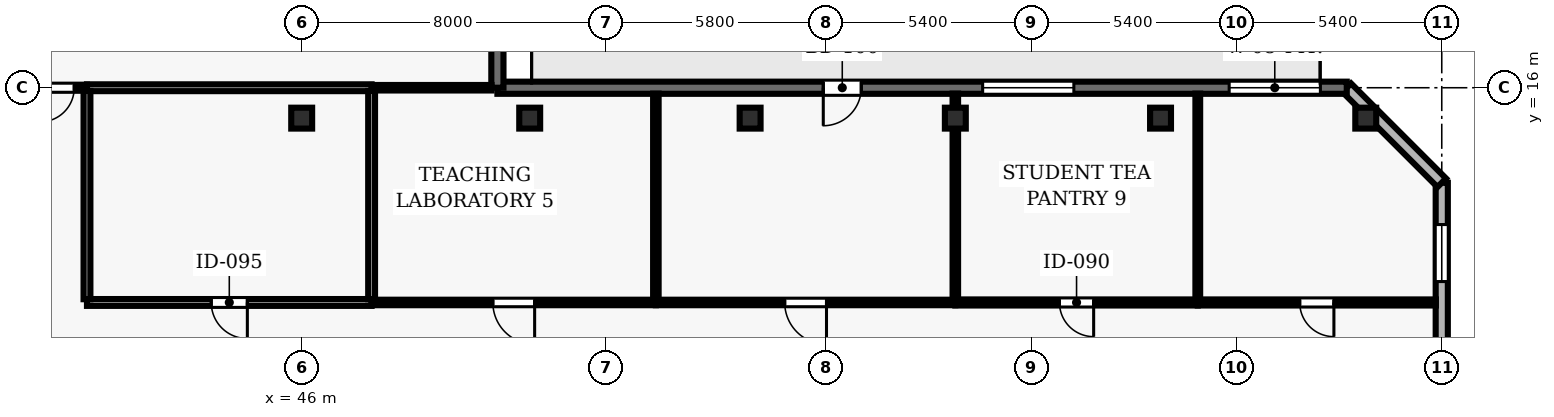
"""IFC4 building model, lengths in metres.
Left out: names, types, materials, properties, quantities, classifications, styles, units other than length and angle.
Written with IfcOpenShell. Run it as: python <this file> out.ifc"""

import sys

from ifc_helpers import new_model, si_unit, direction, frame, frame_2d, origin, origin_2d, place, context, subcontext, project, spatial, rectangle, hollow_rectangle, extrude, element, fill, save


model = new_model("IFC4")
c1 = context("Model", 3, precision=1e-05, world=origin(), true_north=direction((0.0, 1.0)))
c2 = subcontext(c1, "Body", "Model", "MODEL_VIEW")
j1 = project(units=[si_unit("LENGTHUNIT", "METRE"), si_unit("PLANEANGLEUNIT", "RADIAN")], contexts=[c1])
p1 = place(None, origin())
s1 = spatial("IfcSite", under=j1, at=p1, CompositionType="ELEMENT")
p2 = place(p1, origin())
s2 = spatial("IfcBuilding", under=s1, at=p2, CompositionType="ELEMENT")
p3 = place(p2, frame((0.0, 0.0, 66.1)))
s3 = spatial("IfcBuildingStorey", under=s2, at=p3, CompositionType="ELEMENT", Elevation=66.1)
for number, where, z_axis, x_axis in (
    (1, (46.0, 15.2, 0.0), (0.0, 0.0, 1.0), (1.0, 0.0, 0.0)),
    (2, (52.0, 15.2, 0.0), (0.0, 0.0, 1.0), (1.0, 0.0, 0.0)),
    (3, (57.8, 15.2, 0.0), (0.0, 0.0, 1.0), (1.0, 0.0, 0.0)),
    (4, (63.2, 15.2, 0.0), (0.0, 0.0, 1.0), (1.0, 0.0, 0.0)),
    (5, (68.6, 15.2, 0.0), (0.0, 0.0, 1.0), (1.0, 0.0, 0.0)),
    (6, (74.0, 15.2, 0.0), (0.0, 0.0, 1.0), (1.0, 0.0, 0.0)),
):
    element("IfcColumn", number, at=place(p3, frame(where, z_axis=z_axis, x_axis=x_axis)), inside=s3, PredefinedType="COLUMN", context=c2, shape_type="SweptSolid", body=[
        extrude(hollow_rectangle(XDim=0.55, YDim=0.55, WallThickness=0.025, at=origin_2d()), origin(), (0.0, 0.0, 1.0), 3.9),
    ])
p4 = place(p3, frame((76.0, 2.5, 0.0), z_axis=(0.0, 0.0, 1.0), x_axis=(0.0, 1.0, 0.0)))
e7 = element("IfcWall", 7, at=p4, inside=s3, PredefinedType="SOLIDWALL", context=c2, shape_type="SweptSolid", body=[
    extrude(rectangle(XDim=11.0, YDim=0.32, at=frame_2d((5.5, 0.0))), origin(), (0.0, 0.0, 1.0), 3.69),
])
p5 = place(p4, frame((2.0, 0.0, 0.9)))
e8 = element("IfcOpeningElement", 8, at=p5, cuts=e7, PredefinedType="OPENING", context=c2, shape_type="SweptSolid", body=[
    extrude(rectangle(XDim=1.5, YDim=1.8, at=frame_2d((0.75, 0.9))), frame((0.0, 0.17, 0.0), z_axis=(0.0, -1.0, 0.0), x_axis=(1.0, 0.0, 0.0)), (0.0, 0.0, 1.0), 0.34),
])
p6 = place(p4, frame((8.4, 0.0, 0.9)))
e9 = element("IfcOpeningElement", 9, at=p6, cuts=e7, PredefinedType="OPENING", context=c2, shape_type="SweptSolid", body=[
    extrude(rectangle(XDim=1.5, YDim=1.8, at=frame_2d((0.75, 0.9))), frame((0.0, 0.17, 0.0), z_axis=(0.0, -1.0, 0.0), x_axis=(1.0, 0.0, 0.0)), (0.0, 0.0, 1.0), 0.34),
])
p7 = place(p3, frame((76.0, 13.5, 0.0), z_axis=(0.0, 0.0, 1.0), x_axis=(-0.707106781187, 0.707106781187, 0.0)))
e10 = element("IfcWall", 10, at=p7, inside=s3, PredefinedType="SOLIDWALL", context=c2, shape_type="SweptSolid", body=[
    extrude(rectangle(XDim=3.536, YDim=0.32, at=frame_2d((1.768, 0.0))), origin(), (0.0, 0.0, 1.0), 3.69),
])
p8 = place(p3, frame((73.5, 16.0, 0.0), z_axis=(0.0, 0.0, 1.0), x_axis=(-1.0, 0.0, 0.0)))
e11 = element("IfcWall", 11, at=p8, inside=s3, PredefinedType="SOLIDWALL", context=c2, shape_type="SweptSolid", body=[
    extrude(rectangle(XDim=22.35, YDim=0.32, at=frame_2d((11.175, 0.0))), origin(), (0.0, 0.0, 1.0), 3.69),
])
p9 = place(p8, frame((12.775, 0.0, 0.0)))
e12 = element("IfcOpeningElement", 12, at=p9, cuts=e11, PredefinedType="OPENING", context=c2, shape_type="SweptSolid", body=[
    extrude(rectangle(XDim=1.0, YDim=2.2, at=frame_2d((0.5, 1.1))), frame((0.0, 0.17, 0.0), z_axis=(0.0, -1.0, 0.0), x_axis=(1.0, 0.0, 0.0)), (0.0, 0.0, 1.0), 0.34),
])
p10 = place(p8, frame((0.694, 0.0, 0.9)))
e13 = element("IfcOpeningElement", 13, at=p10, cuts=e11, PredefinedType="OPENING", context=c2, shape_type="SweptSolid", body=[
    extrude(rectangle(XDim=2.4, YDim=1.8, at=frame_2d((1.2, 0.9))), frame((0.0, 0.17, 0.0), z_axis=(0.0, -1.0, 0.0), x_axis=(1.0, 0.0, 0.0)), (0.0, 0.0, 1.0), 0.34),
])
p11 = place(p8, frame((7.181, 0.0, 0.9)))
e14 = element("IfcOpeningElement", 14, at=p11, cuts=e11, PredefinedType="OPENING", context=c2, shape_type="SweptSolid", body=[
    extrude(rectangle(XDim=2.4, YDim=1.8, at=frame_2d((1.2, 0.9))), frame((0.0, 0.17, 0.0), z_axis=(0.0, -1.0, 0.0), x_axis=(1.0, 0.0, 0.0)), (0.0, 0.0, 1.0), 0.34),
])
p12 = place(p3, frame((51.15, 16.0, 0.0), z_axis=(0.0, 0.0, 1.0), x_axis=(0.0, 1.0, 0.0)))
e15 = element("IfcWall", 15, at=p12, inside=s3, PredefinedType="SOLIDWALL", context=c2, shape_type="SweptSolid", body=[
    extrude(rectangle(XDim=9.442, YDim=0.32, at=frame_2d((4.721, 0.0))), origin(), (0.0, 0.0, 1.0), 3.69),
])
p13 = place(p12, frame((3.321, 0.0, 0.9)))
e16 = element("IfcOpeningElement", 16, at=p13, cuts=e15, PredefinedType="OPENING", context=c2, shape_type="SweptSolid", body=[
    extrude(rectangle(XDim=2.8, YDim=1.8, at=frame_2d((1.4, 0.9))), frame((0.0, 0.17, 0.0), z_axis=(0.0, -1.0, 0.0), x_axis=(1.0, 0.0, 0.0)), (0.0, 0.0, 1.0), 0.34),
])
p14 = place(p3, frame((40.35, 16.0, 0.0), z_axis=(0.0, 0.0, 1.0), x_axis=(-1.0, 0.0, 0.0)))
e17 = element("IfcWall", 17, at=p14, inside=s3, PredefinedType="PARTITIONING", context=c2, shape_type="SweptSolid", body=[
    extrude(rectangle(XDim=2.27, YDim=0.16, at=frame_2d((1.135, 0.0))), origin(), (0.0, 0.0, 1.0), 3.69),
])
p15 = place(p14, frame((0.335, 0.0, 0.0)))
e18 = element("IfcOpeningElement", 18, at=p15, cuts=e17, PredefinedType="OPENING", context=c2, shape_type="SweptSolid", body=[
    extrude(rectangle(XDim=0.9, YDim=2.1, at=frame_2d((0.45, 1.05))), frame((0.0, 0.09, 0.0), z_axis=(0.0, -1.0, 0.0), x_axis=(1.0, 0.0, 0.0)), (0.0, 0.0, 1.0), 0.18),
])
p16 = place(p3, frame((47.84, 10.35, 0.0), z_axis=(0.0, 0.0, 1.0), x_axis=(-1.0, 0.0, 0.0)))
e19 = element("IfcWall", 19, at=p16, inside=s3, PredefinedType="PARTITIONING", context=c2, shape_type="SweptSolid", body=[
    extrude(rectangle(XDim=7.49, YDim=0.18, at=frame_2d((3.745, 0.0))), origin(), (0.0, 0.0, 1.0), 3.277),
])
p17 = place(p16, frame((3.27, 0.0, 0.0)))
e20 = element("IfcOpeningElement", 20, at=p17, cuts=e19, PredefinedType="OPENING", context=c2, shape_type="SweptSolid", body=[
    extrude(rectangle(XDim=0.95, YDim=2.1, at=frame_2d((0.475, 1.05))), frame((0.0, 0.1, 0.0), z_axis=(0.0, -1.0, 0.0), x_axis=(1.0, 0.0, 0.0)), (0.0, 0.0, 1.0), 0.2),
])
p18 = place(p3, frame((47.84, 16.0, 0.0), z_axis=(0.0, 0.0, 1.0), x_axis=(1.0, 0.0, 0.0)))
e21 = element("IfcWall", 21, at=p18, inside=s3, PredefinedType="PARTITIONING", context=c2, shape_type="SweptSolid", body=[
    extrude(rectangle(XDim=3.155, YDim=0.145, at=frame_2d((1.578, 0.0))), origin(), (0.0, 0.0, 1.0), 3.39),
])
p19 = place(p3, frame((47.84, 16.0, 0.0), z_axis=(0.0, 0.0, 1.0), x_axis=(-1.0, 0.0, 0.0)))
e22 = element("IfcWall", 22, at=p19, inside=s3, PredefinedType="PARTITIONING", context=c2, shape_type="SweptSolid", body=[
    extrude(rectangle(XDim=7.49, YDim=0.18, at=frame_2d((3.745, 0.0))), origin(), (0.0, 0.0, 1.0), 3.39),
])
p20 = place(p3, frame((55.32, 10.35, 0.0), z_axis=(0.0, 0.0, 1.0), x_axis=(-1.0, 0.0, 0.0)))
e23 = element("IfcWall", 23, at=p20, inside=s3, PredefinedType="PARTITIONING", context=c2, shape_type="SweptSolid", body=[
    extrude(rectangle(XDim=7.48, YDim=0.145, at=frame_2d((3.74, 0.0))), origin(), (0.0, 0.0, 1.0), 3.277),
])
p21 = place(p20, frame((3.19, 0.0, 0.0)))
e24 = element("IfcOpeningElement", 24, at=p21, cuts=e23, PredefinedType="OPENING", context=c2, shape_type="SweptSolid", body=[
    extrude(rectangle(XDim=1.1, YDim=2.15, at=frame_2d((0.55, 1.075))), frame((0.0, 0.083, 0.0), z_axis=(0.0, -1.0, 0.0), x_axis=(1.0, 0.0, 0.0)), (0.0, 0.0, 1.0), 0.165),
])
p22 = place(p3, frame((63.2, 10.35, 0.0), z_axis=(0.0, 0.0, 1.0), x_axis=(-1.0, 0.0, 0.0)))
e25 = element("IfcWall", 25, at=p22, inside=s3, PredefinedType="PARTITIONING", context=c2, shape_type="SweptSolid", body=[
    extrude(rectangle(XDim=7.88, YDim=0.145, at=frame_2d((3.94, 0.0))), origin(), (0.0, 0.0, 1.0), 3.277),
])
p23 = place(p22, frame((3.39, 0.0, 0.0)))
e26 = element("IfcOpeningElement", 26, at=p23, cuts=e25, PredefinedType="OPENING", context=c2, shape_type="SweptSolid", body=[
    extrude(rectangle(XDim=1.1, YDim=2.15, at=frame_2d((0.55, 1.075))), frame((0.0, 0.083, 0.0), z_axis=(0.0, -1.0, 0.0), x_axis=(1.0, 0.0, 0.0)), (0.0, 0.0, 1.0), 0.165),
])
p24 = place(p3, frame((69.58, 10.35, 0.0), z_axis=(0.0, 0.0, 1.0), x_axis=(-1.0, 0.0, 0.0)))
e27 = element("IfcWall", 27, at=p24, inside=s3, PredefinedType="PARTITIONING", context=c2, shape_type="SweptSolid", body=[
    extrude(rectangle(XDim=6.38, YDim=0.16, at=frame_2d((3.19, 0.0))), origin(), (0.0, 0.0, 1.0), 3.277),
])
p25 = place(p24, frame((2.74, 0.0, 0.0)))
e28 = element("IfcOpeningElement", 28, at=p25, cuts=e27, PredefinedType="OPENING", context=c2, shape_type="SweptSolid", body=[
    extrude(rectangle(XDim=0.9, YDim=2.1, at=frame_2d((0.45, 1.05))), frame((0.0, 0.09, 0.0), z_axis=(0.0, -1.0, 0.0), x_axis=(1.0, 0.0, 0.0)), (0.0, 0.0, 1.0), 0.18),
])
p26 = place(p3, frame((75.845, 10.35, 0.0), z_axis=(0.0, 0.0, 1.0), x_axis=(-1.0, 0.0, 0.0)))
e29 = element("IfcWall", 29, at=p26, inside=s3, PredefinedType="PARTITIONING", context=c2, shape_type="SweptSolid", body=[
    extrude(rectangle(XDim=6.265, YDim=0.16, at=frame_2d((3.132, 0.0))), origin(), (0.0, 0.0, 1.0), 3.69),
])
p27 = place(p26, frame((2.683, 0.0, 0.0)))
e30 = element("IfcOpeningElement", 30, at=p27, cuts=e29, PredefinedType="OPENING", context=c2, shape_type="SweptSolid", body=[
    extrude(rectangle(XDim=0.9, YDim=2.1, at=frame_2d((0.45, 1.05))), frame((0.0, 0.09, 0.0), z_axis=(0.0, -1.0, 0.0), x_axis=(1.0, 0.0, 0.0)), (0.0, 0.0, 1.0), 0.18),
])
p28 = place(p3, frame((40.35, 10.435, 0.0), z_axis=(0.0, 0.0, 1.0), x_axis=(0.0, 1.0, 0.0)))
e31 = element("IfcWall", 31, at=p28, inside=s3, PredefinedType="PARTITIONING", context=c2, shape_type="SweptSolid", body=[
    extrude(rectangle(XDim=5.48, YDim=0.18, at=frame_2d((2.74, 0.0))), origin(), (0.0, 0.0, 1.0), 3.277),
])
p29 = place(p3, frame((47.84, 10.435, 0.0), z_axis=(0.0, 0.0, 1.0), x_axis=(0.0, 1.0, 0.0)))
e32 = element("IfcWall", 32, at=p29, inside=s3, PredefinedType="PARTITIONING", context=c2, shape_type="SweptSolid", body=[
    extrude(rectangle(XDim=5.48, YDim=0.18, at=frame_2d((2.74, 0.0))), origin(), (0.0, 0.0, 1.0), 3.69),
])
p30 = place(p3, frame((55.32, 10.418, 0.0), z_axis=(0.0, 0.0, 1.0), x_axis=(0.0, 1.0, 0.0)))
e33 = element("IfcWall", 33, at=p30, inside=s3, PredefinedType="PARTITIONING", context=c2, shape_type="SweptSolid", body=[
    extrude(rectangle(XDim=5.427, YDim=0.145, at=frame_2d((2.713, 0.0))), origin(), (0.0, 0.0, 1.0), 3.69),
])
p31 = place(p3, frame((63.2, 10.425, 0.0), z_axis=(0.0, 0.0, 1.0), x_axis=(0.0, 1.0, 0.0)))
e34 = element("IfcWall", 34, at=p31, inside=s3, PredefinedType="PARTITIONING", context=c2, shape_type="SweptSolid", body=[
    extrude(rectangle(XDim=5.42, YDim=0.145, at=frame_2d((2.71, 0.0))), origin(), (0.0, 0.0, 1.0), 3.055),
])
p32 = place(p3, frame((69.58, 10.425, 0.0), z_axis=(0.0, 0.0, 1.0), x_axis=(0.0, 1.0, 0.0)))
e35 = element("IfcWall", 35, at=p32, inside=s3, PredefinedType="PARTITIONING", context=c2, shape_type="SweptSolid", body=[
    extrude(rectangle(XDim=5.42, YDim=0.125, at=frame_2d((2.71, 0.0))), origin(), (0.0, 0.0, 1.0), 3.69),
])
p33 = place(p6, origin())
e36 = element("IfcWindow", 36, at=p33, inside=s3, PartitioningType="SINGLE_PANEL", PredefinedType="WINDOW", context=c2, shape_type="SweptSolid", body=[
    extrude(rectangle(XDim=1.5, YDim=1.8, at=frame_2d((0.75, 0.9))), frame((0.0, 0.03, 0.0), z_axis=(0.0, -1.0, 0.0), x_axis=(1.0, 0.0, 0.0)), (0.0, 0.0, 1.0), 0.06),
])
fill(e9, e36)
p34 = place(p9, origin())
e37 = element("IfcDoor", 37, at=p34, inside=s3, OperationType="SINGLE_SWING_RIGHT", PredefinedType="DOOR", context=c2, shape_type="SweptSolid", body=[
    extrude(rectangle(XDim=1.0, YDim=2.2, at=frame_2d((0.5, 1.1))), frame((0.0, 0.025, 0.0), z_axis=(0.0, -1.0, 0.0), x_axis=(1.0, 0.0, 0.0)), (0.0, 0.0, 1.0), 0.05),
])
fill(e12, e37)
p35 = place(p10, origin())
e38 = element("IfcWindow", 38, at=p35, inside=s3, PartitioningType="SINGLE_PANEL", PredefinedType="WINDOW", context=c2, shape_type="SweptSolid", body=[
    extrude(rectangle(XDim=2.4, YDim=1.8, at=frame_2d((1.2, 0.9))), frame((0.0, 0.03, 0.0), z_axis=(0.0, -1.0, 0.0), x_axis=(1.0, 0.0, 0.0)), (0.0, 0.0, 1.0), 0.06),
])
fill(e13, e38)
p36 = place(p11, origin())
e39 = element("IfcWindow", 39, at=p36, inside=s3, PartitioningType="SINGLE_PANEL", PredefinedType="WINDOW", context=c2, shape_type="SweptSolid", body=[
    extrude(rectangle(XDim=2.4, YDim=1.8, at=frame_2d((1.2, 0.9))), frame((0.0, 0.03, 0.0), z_axis=(0.0, -1.0, 0.0), x_axis=(1.0, 0.0, 0.0)), (0.0, 0.0, 1.0), 0.06),
])
fill(e14, e39)
p37 = place(p17, origin())
e40 = element("IfcDoor", 40, at=p37, inside=s3, OperationType="SINGLE_SWING_LEFT", PredefinedType="DOOR", context=c2, shape_type="SweptSolid", body=[
    extrude(rectangle(XDim=0.95, YDim=2.1, at=frame_2d((0.475, 1.05))), frame((0.0, 0.025, 0.0), z_axis=(0.0, -1.0, 0.0), x_axis=(1.0, 0.0, 0.0)), (0.0, 0.0, 1.0), 0.05),
])
fill(e20, e40)
p38 = place(p21, origin())
e41 = element("IfcDoor", 41, at=p38, inside=s3, OperationType="SINGLE_SWING_LEFT", PredefinedType="DOOR", context=c2, shape_type="SweptSolid", body=[
    extrude(rectangle(XDim=1.1, YDim=2.15, at=frame_2d((0.55, 1.075))), frame((0.0, 0.025, 0.0), z_axis=(0.0, -1.0, 0.0), x_axis=(1.0, 0.0, 0.0)), (0.0, 0.0, 1.0), 0.05),
])
fill(e24, e41)
p39 = place(p23, origin())
e42 = element("IfcDoor", 42, at=p39, inside=s3, OperationType="SINGLE_SWING_LEFT", PredefinedType="DOOR", context=c2, shape_type="SweptSolid", body=[
    extrude(rectangle(XDim=1.1, YDim=2.15, at=frame_2d((0.55, 1.075))), frame((0.0, 0.025, 0.0), z_axis=(0.0, -1.0, 0.0), x_axis=(1.0, 0.0, 0.0)), (0.0, 0.0, 1.0), 0.05),
])
fill(e26, e42)
p40 = place(p25, origin())
e43 = element("IfcDoor", 43, at=p40, inside=s3, OperationType="SINGLE_SWING_LEFT", PredefinedType="DOOR", context=c2, shape_type="SweptSolid", body=[
    extrude(rectangle(XDim=0.9, YDim=2.1, at=frame_2d((0.45, 1.05))), frame((0.0, 0.025, 0.0), z_axis=(0.0, -1.0, 0.0), x_axis=(1.0, 0.0, 0.0)), (0.0, 0.0, 1.0), 0.05),
])
fill(e28, e43)
p41 = place(p27, origin())
e44 = element("IfcDoor", 44, at=p41, inside=s3, OperationType="SINGLE_SWING_LEFT", PredefinedType="DOOR", context=c2, shape_type="SweptSolid", body=[
    extrude(rectangle(XDim=0.9, YDim=2.1, at=frame_2d((0.45, 1.05))), frame((0.0, 0.025, 0.0), z_axis=(0.0, -1.0, 0.0), x_axis=(1.0, 0.0, 0.0)), (0.0, 0.0, 1.0), 0.05),
])
fill(e30, e44)
p42 = place(p15, origin())
e45 = element("IfcDoor", 45, at=p42, inside=s3, OperationType="SINGLE_SWING_RIGHT", PredefinedType="DOOR", context=c2, shape_type="SweptSolid", body=[
    extrude(rectangle(XDim=0.9, YDim=2.1, at=frame_2d((0.45, 1.05))), frame((0.0, 0.025, 0.0), z_axis=(0.0, -1.0, 0.0), x_axis=(1.0, 0.0, 0.0)), (0.0, 0.0, 1.0), 0.05),
])
fill(e18, e45)
save(model, sys.argv[1])
